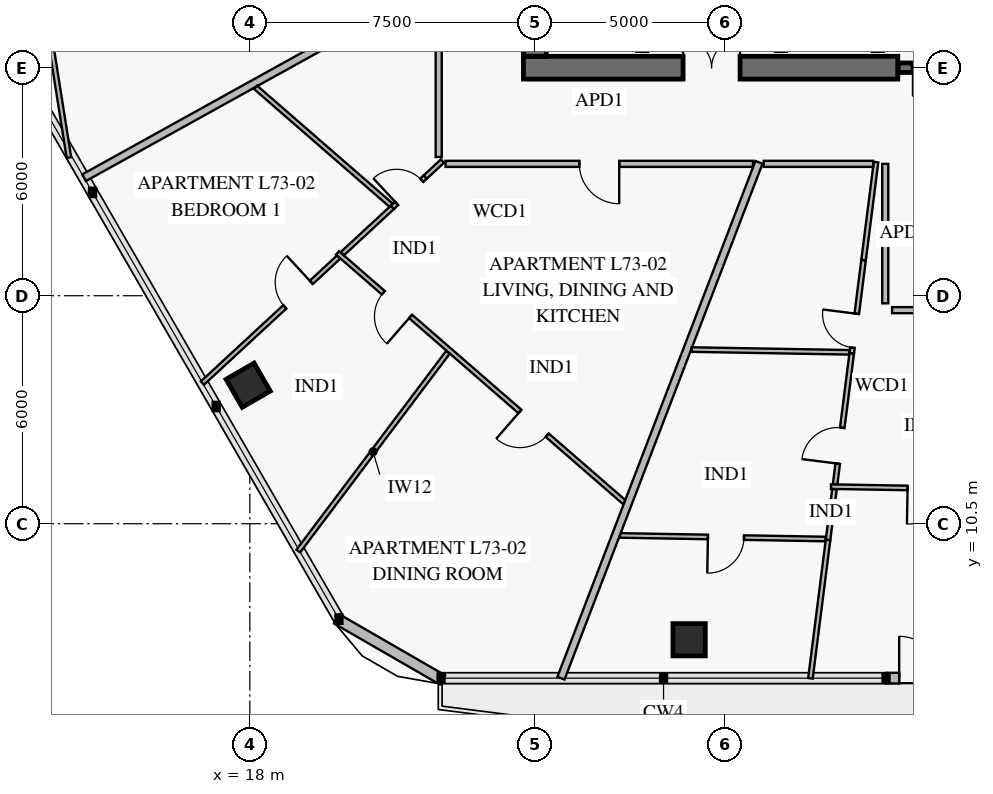
"""IFC4 building model, lengths in metres.
Left out: names, types, materials, properties, quantities, classifications, styles, units other than length and angle.
Written with IfcOpenShell. Run it as: python <this file> out.ifc"""

import sys

from ifc_helpers import new_model, si_unit, direction, frame, frame_2d, origin, origin_2d, place, context, subcontext, project, spatial, rectangle, extrude, element, fill, save


model = new_model("IFC4")
c1 = context("Model", 3, precision=1e-05, world=origin(), true_north=direction((0.0, 1.0)))
c2 = subcontext(c1, "Body", "Model", "MODEL_VIEW")
j1 = project(units=[si_unit("LENGTHUNIT", "METRE"), si_unit("PLANEANGLEUNIT", "RADIAN")], contexts=[c1])
p1 = place(None, origin())
s1 = spatial("IfcSite", under=j1, at=p1, CompositionType="ELEMENT")
p2 = place(p1, origin())
s2 = spatial("IfcBuilding", under=s1, at=p2, CompositionType="ELEMENT")
p3 = place(p2, frame((0.0, 0.0, 288.2)))
s3 = spatial("IfcBuildingStorey", under=s2, at=p3, CompositionType="ELEMENT", Elevation=288.2)
p4 = place(p3, frame((25.2, 22.5, 0.0), z_axis=(0.0, 0.0, 1.0), x_axis=(1.0, 0.0, 0.0)))
e1 = element("IfcWall", 1, at=p4, inside=s3, PredefinedType="SHEAR", context=c2, shape_type="SweptSolid", body=[
    extrude(rectangle(XDim=9.85, YDim=0.6, at=frame_2d((4.925, 0.0))), origin(), (0.0, 0.0, 1.0), 3.8),
])
p5 = place(p4, frame((4.2, 0.0, 0.0)))
e2 = element("IfcOpeningElement", 2, at=p5, cuts=e1, PredefinedType="OPENING", context=c2, shape_type="SweptSolid", body=[
    extrude(rectangle(XDim=1.5, YDim=2.15, at=frame_2d((0.75, 1.075))), frame((0.0, 0.312, 0.0), z_axis=(0.0, -1.0, 0.0), x_axis=(1.0, 0.0, 0.0)), (0.0, 0.0, 1.0), 0.624),
])
p6 = place(p3, frame((25.5, 22.8, 0.0), z_axis=(0.0, 0.0, 1.0), x_axis=(0.0, 1.0, 0.0)))
e3 = element("IfcWall", 3, at=p6, inside=s3, PredefinedType="SHEAR", context=c2, shape_type="SweptSolid", body=[
    extrude(rectangle(XDim=18.4, YDim=0.6, at=frame_2d((9.2, 0.0))), origin(), (0.0, 0.0, 1.0), 3.8),
])
p7 = place(p6, frame((8.95, 0.0, 0.0)))
e4 = element("IfcOpeningElement", 4, at=p7, cuts=e3, PredefinedType="OPENING", context=c2, shape_type="SweptSolid", body=[
    extrude(rectangle(XDim=1.1, YDim=2.15, at=frame_2d((0.55, 1.075))), frame((0.0, 0.312, 0.0), z_axis=(0.0, -1.0, 0.0), x_axis=(1.0, 0.0, 0.0)), (0.0, 0.0, 1.0), 0.624),
])
for number, where, z_axis, x_axis in (
    (5, (17.956, 14.145, 0.0), (0.0, 0.0, 1.0), (0.5, -0.866, 0.0)),
    (6, (29.559, 7.446, 0.0), (0.0, 0.0, 1.0), (1.0, 0.0, 0.0)),
):
    element("IfcColumn", number, at=place(p3, frame(where, z_axis=z_axis, x_axis=x_axis)), inside=s3, PredefinedType="COLUMN", context=c2, shape_type="SweptSolid", body=[
        extrude(rectangle(XDim=0.85, YDim=0.85, at=origin_2d()), origin(), (0.0, 0.0, 1.0), 3.55),
    ])
p8 = place(p3, frame((36.531, 6.436, 0.0), z_axis=(0.0, 0.0, 1.0), x_axis=(-1.0, 0.0, 0.0)))
e7 = element("IfcWall", 7, at=p8, inside=s3, PredefinedType="SOLIDWALL", context=c2, shape_type="SweptSolid", body=[
    extrude(rectangle(XDim=1.79, YDim=0.28, at=frame_2d((0.895, 0.0))), origin(), (0.0, 0.0, 1.0), 3.55),
])
p9 = place(p8, frame((0.345, 0.0, 0.0)))
e8 = element("IfcOpeningElement", 8, at=p9, cuts=e7, PredefinedType="OPENING", context=c2, shape_type="SweptSolid", body=[
    extrude(rectangle(XDim=1.1, YDim=2.2, at=frame_2d((0.55, 1.1))), frame((0.0, 0.152, 0.0), z_axis=(0.0, -1.0, 0.0), x_axis=(1.0, 0.0, 0.0)), (0.0, 0.0, 1.0), 0.304),
])
p10 = place(p3, frame((23.07, 6.389, 0.0), z_axis=(0.0, 0.0, 1.0), x_axis=(-0.866028773314, 0.499994163758, 0.0)))
e9 = element("IfcWall", 9, at=p10, inside=s3, PredefinedType="SOLIDWALL", context=c2, shape_type="SweptSolid", body=[
    extrude(rectangle(XDim=3.215, YDim=0.28, at=frame_2d((1.607, 0.0))), origin(), (0.0, 0.0, 1.0), 3.55),
])
p11 = place(p3, frame((35.06, 22.5, 0.0), z_axis=(0.0, 0.0, 1.0), x_axis=(1.0, 0.0, 0.0)))
e10 = element("IfcWall", 10, at=p11, inside=s3, PredefinedType="SOLIDWALL", context=c2, shape_type="SweptSolid", body=[
    extrude(rectangle(XDim=2.28, YDim=0.25, at=frame_2d((1.14, 0.0))), origin(), (0.0, 0.0, 1.0), 3.8),
])
p12 = place(p11, frame((0.39, 0.0, 0.0)))
e11 = element("IfcOpeningElement", 11, at=p12, cuts=e10, PredefinedType="OPENING", context=c2, shape_type="SweptSolid", body=[
    extrude(rectangle(XDim=1.5, YDim=2.15, at=frame_2d((0.75, 1.075))), frame((0.0, 0.137, 0.0), z_axis=(0.0, -1.0, 0.0), x_axis=(1.0, 0.0, 0.0)), (0.0, 0.0, 1.0), 0.274),
])
p13 = place(p3, frame((11.87, 28.781, 0.0), z_axis=(0.0, 0.0, 1.0), x_axis=(0.156433742153, -0.987688455089, 0.0)))
e12 = element("IfcWall", 12, at=p13, inside=s3, PredefinedType="PARTITIONING", context=c2, shape_type="SweptSolid", body=[
    extrude(rectangle(XDim=8.754, YDim=0.12, at=frame_2d((4.377, 0.0))), origin(), (0.0, 0.0, 1.0), 2.93),
])
p14 = place(p13, frame((1.404, 0.0, 0.0)))
e13 = element("IfcOpeningElement", 13, at=p14, cuts=e12, PredefinedType="OPENING", context=c2, shape_type="SweptSolid", body=[
    extrude(rectangle(XDim=0.95, YDim=2.1, at=frame_2d((0.475, 1.05))), frame((0.0, 0.072, 0.0), z_axis=(0.0, -1.0, 0.0), x_axis=(1.0, 0.0, 0.0)), (0.0, 0.0, 1.0), 0.144),
])
p15 = place(p3, frame((20.308, 17.625, 0.0), z_axis=(0.0, 0.0, 1.0), x_axis=(0.754720551027, -0.656046408311, 0.0)))
e14 = element("IfcWall", 14, at=p15, inside=s3, PredefinedType="PARTITIONING", context=c2, shape_type="SweptSolid", body=[
    extrude(rectangle(XDim=10.006, YDim=0.12, at=frame_2d((5.003, 0.0))), origin(), (0.0, 0.0, 1.0), 2.95),
])
p16 = place(p15, frame((1.597, 0.0, 0.0)))
e15 = element("IfcOpeningElement", 15, at=p16, cuts=e14, PredefinedType="OPENING", context=c2, shape_type="SweptSolid", body=[
    extrude(rectangle(XDim=0.95, YDim=2.1, at=frame_2d((0.475, 1.05))), frame((0.0, 0.072, 0.0), z_axis=(0.0, -1.0, 0.0), x_axis=(1.0, 0.0, 0.0)), (0.0, 0.0, 1.0), 0.144),
])
p17 = place(p15, frame((6.36, 0.0, 0.0)))
e16 = element("IfcOpeningElement", 16, at=p17, cuts=e14, PredefinedType="OPENING", context=c2, shape_type="SweptSolid", body=[
    extrude(rectangle(XDim=0.95, YDim=2.1, at=frame_2d((0.475, 1.05))), frame((0.0, 0.072, 0.0), z_axis=(0.0, -1.0, 0.0), x_axis=(1.0, 0.0, 0.0)), (0.0, 0.0, 1.0), 0.144),
])
p18 = place(p3, frame((22.616, 19.624, 0.0), z_axis=(0.0, 0.0, 1.0), x_axis=(-0.734367339526, -0.678752245401, 0.0)))
e17 = element("IfcWall", 17, at=p18, inside=s3, PredefinedType="PARTITIONING", context=c2, shape_type="SweptSolid", body=[
    extrude(rectangle(XDim=1.181, YDim=0.12, at=frame_2d((0.59, 0.0))), origin(), (0.0, 0.0, 1.0), 3.55),
])
p19 = place(p18, frame((0.126, 0.0, 0.0)))
e18 = element("IfcOpeningElement", 18, at=p19, cuts=e17, PredefinedType="OPENING", context=c2, shape_type="SweptSolid", body=[
    extrude(rectangle(XDim=0.9, YDim=2.1, at=frame_2d((0.45, 1.05))), frame((0.0, 0.072, 0.0), z_axis=(0.0, -1.0, 0.0), x_axis=(1.0, 0.0, 0.0)), (0.0, 0.0, 1.0), 0.144),
])
p20 = place(p3, frame((21.749, 18.822, 0.0), z_axis=(0.0, 0.0, 1.0), x_axis=(-0.734170781852, -0.678964846715, 0.0)))
e19 = element("IfcWall", 19, at=p20, inside=s3, PredefinedType="PARTITIONING", context=c2, shape_type="SweptSolid", body=[
    extrude(rectangle(XDim=1.791, YDim=0.12, at=frame_2d((0.896, 0.0))), origin(), (0.0, 0.0, 1.0), 3.15),
])
p21 = place(p3, frame((20.334, 17.513, 0.0), z_axis=(0.0, 0.0, 1.0), x_axis=(-0.734219813618, -0.678911824386, 0.0)))
e20 = element("IfcWall", 20, at=p21, inside=s3, PredefinedType="PARTITIONING", context=c2, shape_type="SweptSolid", body=[
    extrude(rectangle(XDim=4.878, YDim=0.12, at=frame_2d((2.439, 0.0))), origin(), (0.0, 0.0, 1.0), 2.93),
])
p22 = place(p21, frame((0.975, 0.0, 0.0)))
e21 = element("IfcOpeningElement", 21, at=p22, cuts=e20, PredefinedType="OPENING", context=c2, shape_type="SweptSolid", body=[
    extrude(rectangle(XDim=0.95, YDim=2.1, at=frame_2d((0.475, 1.05))), frame((0.0, 0.072, 0.0), z_axis=(0.0, -1.0, 0.0), x_axis=(1.0, 0.0, 0.0)), (0.0, 0.0, 1.0), 0.144),
])
p23 = place(p3, frame((23.15, 19.97, 0.0), z_axis=(0.0, 0.0, 1.0), x_axis=(1.0, 0.0, 0.0)))
e22 = element("IfcWall", 22, at=p23, inside=s3, PredefinedType="PARTITIONING", context=c2, shape_type="SweptSolid", body=[
    extrude(rectangle(XDim=8.09, YDim=0.16, at=frame_2d((4.045, 0.0))), origin(), (0.0, 0.0, 1.0), 2.95),
])
p24 = place(p23, frame((3.52, 0.0, 0.0)))
e23 = element("IfcOpeningElement", 23, at=p24, cuts=e22, PredefinedType="OPENING", context=c2, shape_type="SweptSolid", body=[
    extrude(rectangle(XDim=1.05, YDim=2.15, at=frame_2d((0.525, 1.075))), frame((0.0, 0.092, 0.0), z_axis=(0.0, -1.0, 0.0), x_axis=(1.0, 0.0, 0.0)), (0.0, 0.0, 1.0), 0.184),
])
p25 = place(p3, frame((33.292, 11.476, 0.0), z_axis=(0.0, 0.0, 1.0), x_axis=(0.999847788191, -0.01744707568, 0.0)))
e24 = element("IfcWall", 24, at=p25, inside=s3, PredefinedType="PARTITIONING", context=c2, shape_type="SweptSolid", body=[
    extrude(rectangle(XDim=9.739, YDim=0.12, at=frame_2d((4.87, 0.0))), origin(), (0.0, 0.0, 1.0), 2.95),
])
p26 = place(p25, frame((2.016, 0.0, 0.0)))
e25 = element("IfcOpeningElement", 25, at=p26, cuts=e24, PredefinedType="OPENING", context=c2, shape_type="SweptSolid", body=[
    extrude(rectangle(XDim=0.95, YDim=2.1, at=frame_2d((0.475, 1.05))), frame((0.0, 0.072, 0.0), z_axis=(0.0, -1.0, 0.0), x_axis=(1.0, 0.0, 0.0)), (0.0, 0.0, 1.0), 0.144),
])
p27 = place(p25, frame((6.645, 0.0, 0.0)))
e26 = element("IfcOpeningElement", 26, at=p27, cuts=e24, PredefinedType="OPENING", context=c2, shape_type="SweptSolid", body=[
    extrude(rectangle(XDim=0.95, YDim=2.1, at=frame_2d((0.475, 1.05))), frame((0.0, 0.072, 0.0), z_axis=(0.0, -1.0, 0.0), x_axis=(1.0, 0.0, 0.0)), (0.0, 0.0, 1.0), 0.144),
])
p28 = place(p3, frame((34.15, 17.438, 0.0), z_axis=(0.0, 0.0, 1.0), x_axis=(-0.125966368588, -0.992034512497, 0.0)))
e27 = element("IfcWall", 27, at=p28, inside=s3, PredefinedType="PARTITIONING", context=c2, shape_type="SweptSolid", body=[
    extrude(rectangle(XDim=2.473, YDim=0.12, at=frame_2d((1.237, 0.0))), origin(), (0.0, 0.0, 1.0), 3.55),
])
p29 = place(p28, frame((1.425, 0.0, 0.0)))
e28 = element("IfcOpeningElement", 28, at=p29, cuts=e27, PredefinedType="OPENING", context=c2, shape_type="SweptSolid", body=[
    extrude(rectangle(XDim=0.9, YDim=2.1, at=frame_2d((0.45, 1.05))), frame((0.0, 0.072, 0.0), z_axis=(0.0, -1.0, 0.0), x_axis=(1.0, 0.0, 0.0)), (0.0, 0.0, 1.0), 0.144),
])
p30 = place(p3, frame((33.838, 14.984, 0.0), z_axis=(0.0, 0.0, 1.0), x_axis=(-0.126008805625, -0.992029123012, 0.0)))
e29 = element("IfcWall", 29, at=p30, inside=s3, PredefinedType="PARTITIONING", context=c2, shape_type="SweptSolid", body=[
    extrude(rectangle(XDim=3.47, YDim=0.12, at=frame_2d((1.735, 0.0))), origin(), (0.0, 0.0, 1.0), 3.15),
])
p31 = place(p30, frame((1.976, 0.0, 0.0)))
e30 = element("IfcOpeningElement", 30, at=p31, cuts=e29, PredefinedType="OPENING", context=c2, shape_type="SweptSolid", body=[
    extrude(rectangle(XDim=0.95, YDim=2.1, at=frame_2d((0.475, 1.05))), frame((0.0, 0.072, 0.0), z_axis=(0.0, -1.0, 0.0), x_axis=(1.0, 0.0, 0.0)), (0.0, 0.0, 1.0), 0.144),
])
p32 = place(p3, frame((33.384, 11.406, 0.0), z_axis=(0.0, 0.0, 1.0), x_axis=(-0.126066042506, -0.992021851033, 0.0)))
e31 = element("IfcWall", 31, at=p32, inside=s3, PredefinedType="PARTITIONING", context=c2, shape_type="SweptSolid", body=[
    extrude(rectangle(XDim=1.346, YDim=0.12, at=frame_2d((0.673, 0.0))), origin(), (0.0, 0.0, 1.0), 3.55),
])
p33 = place(p3, frame((27.74, 10.192, 0.0), z_axis=(0.0, 0.0, 1.0), x_axis=(0.999847499712, -0.017463599873, 0.0)))
e32 = element("IfcWall", 32, at=p33, inside=s3, PredefinedType="PARTITIONING", context=c2, shape_type="SweptSolid", body=[
    extrude(rectangle(XDim=5.41, YDim=0.12, at=frame_2d((2.705, 0.0))), origin(), (0.0, 0.0, 1.0), 2.95),
])
p34 = place(p33, frame((2.315, 0.0, 0.0)))
e33 = element("IfcOpeningElement", 33, at=p34, cuts=e32, PredefinedType="OPENING", context=c2, shape_type="SweptSolid", body=[
    extrude(rectangle(XDim=0.95, YDim=2.1, at=frame_2d((0.475, 1.05))), frame((0.0, 0.072, 0.0), z_axis=(0.0, -1.0, 0.0), x_axis=(1.0, 0.0, 0.0)), (0.0, 0.0, 1.0), 0.144),
])
p35 = place(p3, frame((23.01, 24.8, 0.0), z_axis=(0.0, 0.0, 1.0), x_axis=(-0.874612572959, -0.484822490426, 0.0)))
e34 = element("IfcWall", 34, at=p35, inside=s3, PredefinedType="PARTITIONING", context=c2, shape_type="SweptSolid", body=[
    extrude(rectangle(XDim=10.715, YDim=0.2, at=frame_2d((5.358, 0.0))), origin(), (0.0, 0.0, 1.0), 2.93),
])
p36 = place(p3, frame((23.212, 15.01, 0.0), z_axis=(0.0, 0.0, 1.0), x_axis=(-0.601359603613, -0.798978489787, 0.0)))
e35 = element("IfcWall", 35, at=p36, inside=s3, PredefinedType="PARTITIONING", context=c2, shape_type="SweptSolid", body=[
    extrude(rectangle(XDim=6.546, YDim=0.12, at=frame_2d((3.273, 0.0))), origin(), (0.0, 0.0, 1.0), 2.93),
])
p37 = place(p3, frame((23.069, 20.042, 0.0), z_axis=(0.0, 0.0, 1.0), x_axis=(-0.73410437669, -0.67903664417, 0.0)))
e36 = element("IfcWall", 36, at=p37, inside=s3, PredefinedType="PARTITIONING", context=c2, shape_type="SweptSolid", body=[
    extrude(rectangle(XDim=0.616, YDim=0.12, at=frame_2d((0.308, 0.0))), origin(), (0.0, 0.0, 1.0), 3.55),
])
p38 = place(p3, frame((18.151, 21.983, 0.0), z_axis=(0.0, 0.0, 1.0), x_axis=(0.754743487658, -0.656020020912, 0.0)))
e37 = element("IfcWall", 37, at=p38, inside=s3, PredefinedType="PARTITIONING", context=c2, shape_type="SweptSolid", body=[
    extrude(rectangle(XDim=4.723, YDim=0.12, at=frame_2d((2.362, 0.0))), origin(), (0.0, 0.0, 1.0), 3.15),
])
p39 = place(p3, frame((31.397, 20.01, 0.0), z_axis=(0.0, 0.0, 1.0), x_axis=(-0.358366886744, -0.933580834468, 0.0)))
e38 = element("IfcWall", 38, at=p39, inside=s3, PredefinedType="PARTITIONING", context=c2, shape_type="SweptSolid", body=[
    extrude(rectangle(XDim=14.539, YDim=0.2, at=frame_2d((7.27, 0.0))), origin(), (0.0, 0.0, 1.0), 2.93),
])
p40 = place(p3, frame((34.477, 20.015, 0.0), z_axis=(0.0, 0.0, 1.0), x_axis=(-0.126023918114, -0.992027203288, 0.0)))
e39 = element("IfcWall", 39, at=p40, inside=s3, PredefinedType="PARTITIONING", context=c2, shape_type="SweptSolid", body=[
    extrude(rectangle(XDim=2.598, YDim=0.12, at=frame_2d((1.299, 0.0))), origin(), (0.0, 0.0, 1.0), 3.55),
])
p41 = place(p3, frame((33.214, 10.071, 0.0), z_axis=(0.0, 0.0, 1.0), x_axis=(-0.126032826636, -0.992026071537, 0.0)))
e40 = element("IfcWall", 40, at=p41, inside=s3, PredefinedType="PARTITIONING", context=c2, shape_type="SweptSolid", body=[
    extrude(rectangle(XDim=3.669, YDim=0.12, at=frame_2d((1.834, 0.0))), origin(), (0.0, 0.0, 1.0), 2.93),
])
p42 = place(p3, frame((29.622, 15.083, 0.0), z_axis=(0.0, 0.0, 1.0), x_axis=(0.999847495958, -0.017463814767, 0.0)))
e41 = element("IfcWall", 41, at=p42, inside=s3, PredefinedType="PARTITIONING", context=c2, shape_type="SweptSolid", body=[
    extrude(rectangle(XDim=4.152, YDim=0.12, at=frame_2d((2.076, 0.0))), origin(), (0.0, 0.0, 1.0), 2.95),
])
p43 = place(p3, frame((22.97, 24.605, 0.0), z_axis=(0.0, 0.0, 1.0), x_axis=(0.0, -1.0, 0.0)))
e42 = element("IfcWall", 42, at=p43, inside=s3, PredefinedType="PARTITIONING", context=c2, shape_type="SweptSolid", body=[
    extrude(rectangle(XDim=4.455, YDim=0.16, at=frame_2d((2.228, 0.0))), origin(), (0.0, 0.0, 1.0), 3.55),
])
p44 = place(p3, frame((34.72, 19.97, 0.0), z_axis=(0.0, 0.0, 1.0), x_axis=(0.0, -1.0, 0.0)))
e43 = element("IfcWall", 43, at=p44, inside=s3, PredefinedType="PARTITIONING", context=c2, shape_type="SweptSolid", body=[
    extrude(rectangle(XDim=3.67, YDim=0.16, at=frame_2d((1.835, 0.0))), origin(), (0.0, 0.0, 1.0), 3.55),
])
p45 = place(p3, frame((34.9, 16.12, 0.0), z_axis=(0.0, 0.0, 1.0), x_axis=(1.0, 0.0, 0.0)))
e44 = element("IfcWall", 44, at=p45, inside=s3, PredefinedType="PARTITIONING", context=c2, shape_type="SweptSolid", body=[
    extrude(rectangle(XDim=2.2, YDim=0.16, at=frame_2d((1.1, 0.0))), origin(), (0.0, 0.0, 1.0), 3.55),
])
p46 = place(p3, frame((31.523, 19.97, 0.0), z_axis=(0.0, 0.0, 1.0), x_axis=(1.0, 0.0, 0.0)))
e45 = element("IfcWall", 45, at=p46, inside=s3, PredefinedType="PARTITIONING", context=c2, shape_type="SweptSolid", body=[
    extrude(rectangle(XDim=2.88, YDim=0.16, at=frame_2d((1.44, 0.0))), origin(), (0.0, 0.0, 1.0), 2.95),
])
p47 = place(p9, frame((1.1, 0.0, 0.0), z_axis=(0.0, 0.0, 1.0), x_axis=(-1.0, 0.0, 0.0)))
e46 = element("IfcDoor", 46, at=p47, inside=s3, OperationType="SINGLE_SWING_LEFT", PredefinedType="DOOR", context=c2, shape_type="SweptSolid", body=[
    extrude(rectangle(XDim=1.1, YDim=2.2, at=frame_2d((0.55, 1.1))), frame((0.0, 0.025, 0.0), z_axis=(0.0, -1.0, 0.0), x_axis=(1.0, 0.0, 0.0)), (0.0, 0.0, 1.0), 0.05),
])
fill(e8, e46)
p48 = place(p5, origin())
e47 = element("IfcDoor", 47, at=p48, inside=s3, OperationType="DOUBLE_DOOR_SINGLE_SWING", PredefinedType="DOOR", context=c2, shape_type="SweptSolid", body=[
    extrude(rectangle(XDim=1.5, YDim=2.15, at=frame_2d((0.75, 1.075))), frame((0.0, 0.025, 0.0), z_axis=(0.0, -1.0, 0.0), x_axis=(1.0, 0.0, 0.0)), (0.0, 0.0, 1.0), 0.05),
])
fill(e2, e47)
p49 = place(p12, frame((1.5, 0.0, 0.0), z_axis=(0.0, 0.0, 1.0), x_axis=(-1.0, 0.0, 0.0)))
e48 = element("IfcDoor", 48, at=p49, inside=s3, OperationType="DOUBLE_DOOR_SINGLE_SWING", PredefinedType="DOOR", context=c2, shape_type="SweptSolid", body=[
    extrude(rectangle(XDim=1.5, YDim=2.15, at=frame_2d((0.75, 1.075))), frame((0.0, 0.025, 0.0), z_axis=(0.0, -1.0, 0.0), x_axis=(1.0, 0.0, 0.0)), (0.0, 0.0, 1.0), 0.05),
])
fill(e11, e48)
p50 = place(p16, frame((0.95, 0.0, 0.0), z_axis=(0.0, 0.0, 1.0), x_axis=(-1.0, 0.0, 0.0)))
e49 = element("IfcDoor", 49, at=p50, inside=s3, OperationType="SINGLE_SWING_LEFT", PredefinedType="DOOR", context=c2, shape_type="SweptSolid", body=[
    extrude(rectangle(XDim=0.95, YDim=2.1, at=frame_2d((0.475, 1.05))), frame((0.0, 0.025, 0.0), z_axis=(0.0, -1.0, 0.0), x_axis=(1.0, 0.0, 0.0)), (0.0, 0.0, 1.0), 0.05),
])
fill(e15, e49)
p51 = place(p17, frame((0.95, 0.0, 0.0), z_axis=(0.0, 0.0, 1.0), x_axis=(-1.0, 0.0, 0.0)))
e50 = element("IfcDoor", 50, at=p51, inside=s3, OperationType="SINGLE_SWING_RIGHT", PredefinedType="DOOR", context=c2, shape_type="SweptSolid", body=[
    extrude(rectangle(XDim=0.95, YDim=2.1, at=frame_2d((0.475, 1.05))), frame((0.0, 0.025, 0.0), z_axis=(0.0, -1.0, 0.0), x_axis=(1.0, 0.0, 0.0)), (0.0, 0.0, 1.0), 0.05),
])
fill(e16, e50)
p52 = place(p19, frame((0.9, 0.0, 0.0), z_axis=(0.0, 0.0, 1.0), x_axis=(-1.0, 0.0, 0.0)))
e51 = element("IfcDoor", 51, at=p52, inside=s3, OperationType="SINGLE_SWING_LEFT", PredefinedType="DOOR", context=c2, shape_type="SweptSolid", body=[
    extrude(rectangle(XDim=0.9, YDim=2.1, at=frame_2d((0.45, 1.05))), frame((0.0, 0.025, 0.0), z_axis=(0.0, -1.0, 0.0), x_axis=(1.0, 0.0, 0.0)), (0.0, 0.0, 1.0), 0.05),
])
fill(e18, e51)
p53 = place(p22, frame((0.95, 0.0, 0.0), z_axis=(0.0, 0.0, 1.0), x_axis=(-1.0, 0.0, 0.0)))
e52 = element("IfcDoor", 52, at=p53, inside=s3, OperationType="SINGLE_SWING_RIGHT", PredefinedType="DOOR", context=c2, shape_type="SweptSolid", body=[
    extrude(rectangle(XDim=0.95, YDim=2.1, at=frame_2d((0.475, 1.05))), frame((0.0, 0.025, 0.0), z_axis=(0.0, -1.0, 0.0), x_axis=(1.0, 0.0, 0.0)), (0.0, 0.0, 1.0), 0.05),
])
fill(e21, e52)
p54 = place(p24, frame((1.05, 0.0, 0.0), z_axis=(0.0, 0.0, 1.0), x_axis=(-1.0, 0.0, 0.0)))
e53 = element("IfcDoor", 53, at=p54, inside=s3, OperationType="SINGLE_SWING_LEFT", PredefinedType="DOOR", context=c2, shape_type="SweptSolid", body=[
    extrude(rectangle(XDim=1.05, YDim=2.15, at=frame_2d((0.525, 1.075))), frame((0.0, 0.025, 0.0), z_axis=(0.0, -1.0, 0.0), x_axis=(1.0, 0.0, 0.0)), (0.0, 0.0, 1.0), 0.05),
])
fill(e23, e53)
p55 = place(p26, frame((0.95, 0.0, 0.0), z_axis=(0.0, 0.0, 1.0), x_axis=(-1.0, 0.0, 0.0)))
e54 = element("IfcDoor", 54, at=p55, inside=s3, OperationType="SINGLE_SWING_RIGHT", PredefinedType="DOOR", context=c2, shape_type="SweptSolid", body=[
    extrude(rectangle(XDim=0.95, YDim=2.1, at=frame_2d((0.475, 1.05))), frame((0.0, 0.025, 0.0), z_axis=(0.0, -1.0, 0.0), x_axis=(1.0, 0.0, 0.0)), (0.0, 0.0, 1.0), 0.05),
])
fill(e25, e54)
p56 = place(p29, frame((0.9, 0.0, 0.0), z_axis=(0.0, 0.0, 1.0), x_axis=(-1.0, 0.0, 0.0)))
e55 = element("IfcDoor", 55, at=p56, inside=s3, OperationType="SINGLE_SWING_RIGHT", PredefinedType="DOOR", context=c2, shape_type="SweptSolid", body=[
    extrude(rectangle(XDim=0.9, YDim=2.1, at=frame_2d((0.45, 1.05))), frame((0.0, 0.025, 0.0), z_axis=(0.0, -1.0, 0.0), x_axis=(1.0, 0.0, 0.0)), (0.0, 0.0, 1.0), 0.05),
])
fill(e28, e55)
p57 = place(p31, frame((0.95, 0.0, 0.0), z_axis=(0.0, 0.0, 1.0), x_axis=(-1.0, 0.0, 0.0)))
e56 = element("IfcDoor", 56, at=p57, inside=s3, OperationType="SINGLE_SWING_LEFT", PredefinedType="DOOR", context=c2, shape_type="SweptSolid", body=[
    extrude(rectangle(XDim=0.95, YDim=2.1, at=frame_2d((0.475, 1.05))), frame((0.0, 0.025, 0.0), z_axis=(0.0, -1.0, 0.0), x_axis=(1.0, 0.0, 0.0)), (0.0, 0.0, 1.0), 0.05),
])
fill(e30, e56)
p58 = place(p34, frame((0.95, 0.0, 0.0), z_axis=(0.0, 0.0, 1.0), x_axis=(-1.0, 0.0, 0.0)))
e57 = element("IfcDoor", 57, at=p58, inside=s3, OperationType="SINGLE_SWING_RIGHT", PredefinedType="DOOR", context=c2, shape_type="SweptSolid", body=[
    extrude(rectangle(XDim=0.95, YDim=2.1, at=frame_2d((0.475, 1.05))), frame((0.0, 0.025, 0.0), z_axis=(0.0, -1.0, 0.0), x_axis=(1.0, 0.0, 0.0)), (0.0, 0.0, 1.0), 0.05),
])
fill(e33, e57)
save(model, sys.argv[1])
